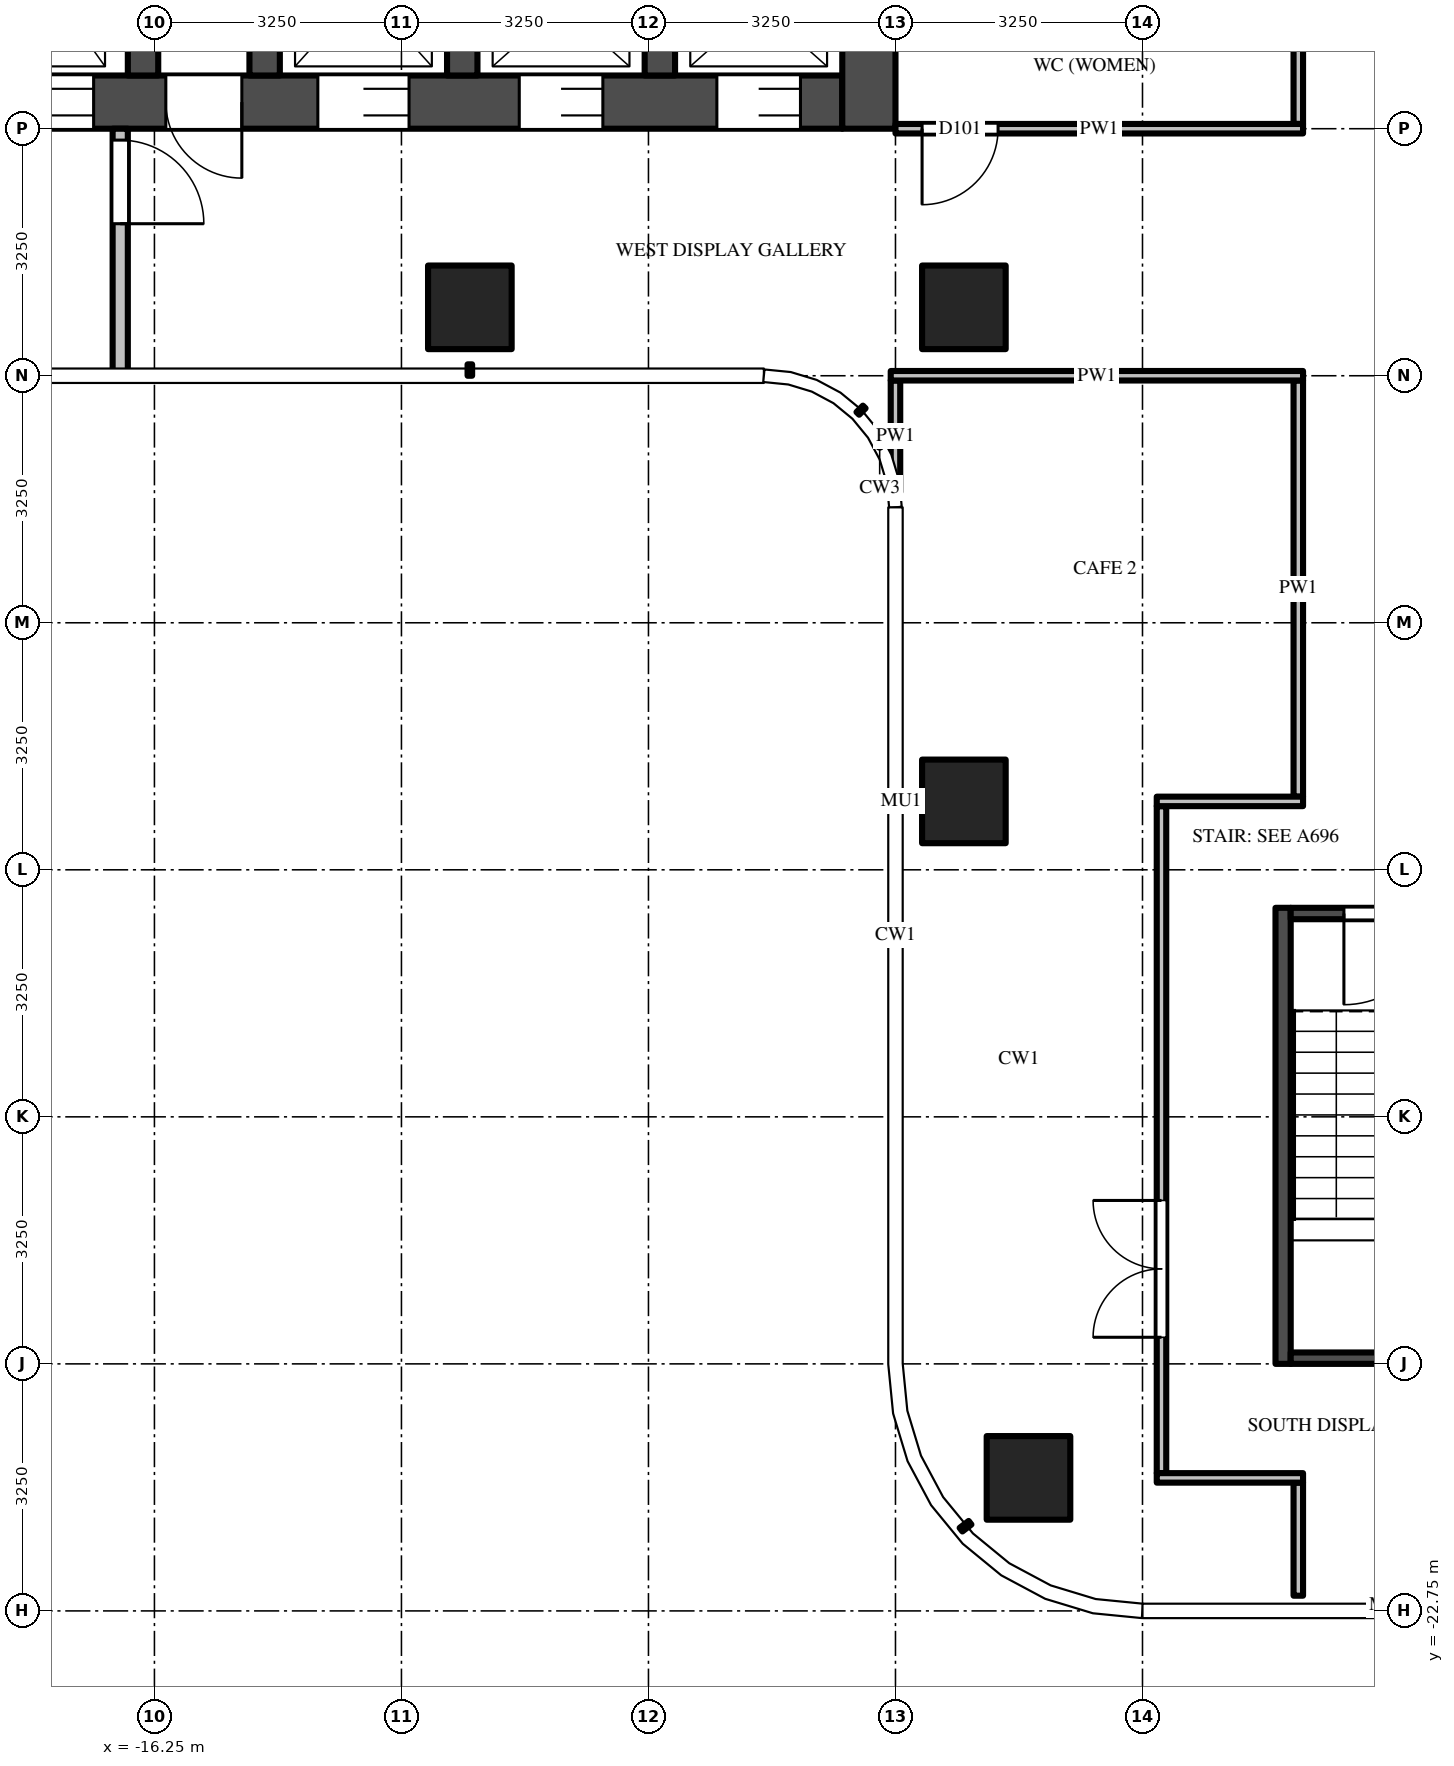
"""IFC4 building model, lengths in metres.
Left out: names, types, materials, properties, quantities, classifications, styles, units other than length and angle.
Written with IfcOpenShell. Run it as: python <this file> out.ifc"""

import sys

from ifc_helpers import new_model, si_unit, direction, frame, frame_2d, origin, origin_2d, place, context, subcontext, project, spatial, polyline, rectangle, outline, extrude, source, transform, mapped, element, fill, save


model = new_model("IFC4")
c1 = context("Model", 3, precision=1e-05, world=origin(), true_north=direction((0.0, 1.0)))
c2 = subcontext(c1, "Body", "Model", "MODEL_VIEW")
j1 = project(units=[si_unit("LENGTHUNIT", "METRE"), si_unit("PLANEANGLEUNIT", "RADIAN")], contexts=[c1])
p1 = place(None, origin())
s1 = spatial("IfcSite", under=j1, at=p1, CompositionType="ELEMENT")
p2 = place(p1, origin())
s2 = spatial("IfcBuilding", under=s1, at=p2, CompositionType="ELEMENT")
p3 = place(p2, frame((0.0, 0.0, 251.9)))
s3 = spatial("IfcBuildingStorey", under=s2, at=p3, CompositionType="ELEMENT", Elevation=251.9)
m1 = source(origin(), c2, "Body", "SweptSolid", [
    extrude(rectangle(XDim=1.1, YDim=1.1, at=origin_2d()), origin(), (0.0, 0.0, 1.0), 3.9),
])
for number, where, z_axis, x_axis in (
    (1, (-5.6, -5.6, 0.0), (0.0, 0.0, 1.0), (1.0, 0.0, 0.0)),
    (2, (-5.6, -12.1, 0.0), (0.0, 0.0, 1.0), (1.0, 0.0, 0.0)),
    (3, (-4.75, -21.0, 0.0), (0.0, 0.0, 1.0), (1.0, 0.0, 0.0)),
    (4, (-12.1, -5.6, 0.0), (0.0, 0.0, 1.0), (1.0, 0.0, 0.0)),
):
    element("IfcColumn", number, at=place(p3, frame(where, z_axis=z_axis, x_axis=x_axis)), inside=s3, PredefinedType="COLUMN", context=c2, shape_type="MappedRepresentation", body=[
        mapped(m1, transform((0.0, 0.0, 0.0))),
    ])
m2 = source(origin(), c2, "Body", "SweptSolid", [
    extrude(rectangle(XDim=14.85, YDim=0.7, at=frame_2d((7.425, 0.0))), origin(), (0.0, 0.0, 1.0), 3.7),
])
p4 = place(p3, frame((-7.2, -2.9, 0.0), z_axis=(0.0, 0.0, 1.0), x_axis=(-1.0, 0.0, 0.0)))
e5 = element("IfcWall", 5, at=p4, inside=s3, PredefinedType="SHEAR", context=c2, shape_type="MappedRepresentation", body=[
    mapped(m2, transform((0.0, 0.0, 0.0))),
])
m3 = source(origin(), c2, "Body", "SweptSolid", [
    extrude(rectangle(XDim=1.1, YDim=2.1, at=frame_2d((0.55, 1.05))), frame((0.0, 0.36, 0.0), z_axis=(0.0, -1.0, 0.0), x_axis=(1.0, 0.0, 0.0)), (0.0, 0.0, 1.0), 0.72),
])
p5 = place(p4, frame((0.55, 0.0, 0.0)))
e6 = element("IfcOpeningElement", 6, at=p5, cuts=e5, PredefinedType="OPENING", context=c2, shape_type="MappedRepresentation", body=[
    mapped(m3, transform((0.0, 0.0, 0.0))),
])
p6 = place(p4, frame((3.15, 0.0, 0.0)))
e7 = element("IfcOpeningElement", 7, at=p6, cuts=e5, PredefinedType="OPENING", context=c2, shape_type="MappedRepresentation", body=[
    mapped(m3, transform((0.0, 0.0, 0.0))),
])
m4 = source(origin(), c2, "Body", "SweptSolid", [
    extrude(rectangle(XDim=1.2, YDim=2.1, at=frame_2d((0.6, 1.05))), frame((0.0, 0.36, 0.0), z_axis=(0.0, -1.0, 0.0), x_axis=(1.0, 0.0, 0.0)), (0.0, 0.0, 1.0), 0.72),
])
p7 = place(p4, frame((5.7, 0.0, 0.0)))
e8 = element("IfcOpeningElement", 8, at=p7, cuts=e5, PredefinedType="OPENING", context=c2, shape_type="MappedRepresentation", body=[
    mapped(m4, transform((0.0, 0.0, 0.0))),
])
m5 = source(origin(), c2, "Body", "SweptSolid", [
    extrude(rectangle(XDim=1.3, YDim=2.1, at=frame_2d((0.65, 1.05))), frame((0.0, 0.36, 0.0), z_axis=(0.0, -1.0, 0.0), x_axis=(1.0, 0.0, 0.0)), (0.0, 0.0, 1.0), 0.72),
])
p8 = place(p4, frame((12.2, 0.0, 0.0)))
e9 = element("IfcOpeningElement", 9, at=p8, cuts=e5, PredefinedType="OPENING", context=c2, shape_type="MappedRepresentation", body=[
    mapped(m5, transform((0.0, 0.0, 0.0))),
])
p9 = place(p4, frame((9.85, 0.0, 0.0)))
e10 = element("IfcOpeningElement", 10, at=p9, cuts=e5, PredefinedType="OPENING", context=c2, shape_type="MappedRepresentation", body=[
    mapped(m4, transform((0.0, 0.0, 0.0))),
])
m6 = source(origin(), c2, "Body", "SweptSolid", [
    extrude(rectangle(XDim=1.0, YDim=2.1, at=frame_2d((0.5, 1.05))), frame((0.0, 0.36, 0.0), z_axis=(0.0, -1.0, 0.0), x_axis=(1.0, 0.0, 0.0)), (0.0, 0.0, 1.0), 0.72),
])
p10 = place(p4, frame((7.9, 0.0, 0.0)))
e11 = element("IfcOpeningElement", 11, at=p10, cuts=e5, PredefinedType="OPENING", context=c2, shape_type="MappedRepresentation", body=[
    mapped(m6, transform((0.0, 0.0, 0.0))),
])
m7 = source(origin(), c2, "Body", "SweptSolid", [
    extrude(rectangle(XDim=9.05, YDim=0.7, at=frame_2d((4.525, 0.0))), origin(), (0.0, 0.0, 1.0), 3.7),
])
p11 = place(p3, frame((-6.85, 5.8, 0.0), z_axis=(0.0, 0.0, 1.0), x_axis=(0.0, -1.0, 0.0)))
e12 = element("IfcWall", 12, at=p11, inside=s3, PredefinedType="SHEAR", context=c2, shape_type="MappedRepresentation", body=[
    mapped(m7, transform((0.0, 0.0, 0.0))),
])
m8 = source(origin(), c2, "Body", "SweptSolid", [
    extrude(rectangle(XDim=1.8, YDim=2.1, at=frame_2d((0.9, 1.05))), frame((0.0, 0.36, 0.0), z_axis=(0.0, -1.0, 0.0), x_axis=(1.0, 0.0, 0.0)), (0.0, 0.0, 1.0), 0.72),
])
p12 = place(p11, frame((3.15, 0.0, 0.0)))
e13 = element("IfcOpeningElement", 13, at=p12, cuts=e12, PredefinedType="OPENING", context=c2, shape_type="MappedRepresentation", body=[
    mapped(m8, transform((0.0, 0.0, 0.0))),
])
m9 = source(origin(), c2, "Body", "SweptSolid", [
    extrude(rectangle(XDim=2.45, YDim=0.4, at=frame_2d((1.225, 0.0))), origin(), (0.0, 0.0, 1.0), 3.7),
])
for number, where, z_axis, x_axis in (
    (14, (-9.6, -0.1, 0.0), (0.0, 0.0, 1.0), (0.0, -1.0, 0.0)),
    (15, (-12.2, -0.1, 0.0), (0.0, 0.0, 1.0), (0.0, -1.0, 0.0)),
    (16, (-14.8, -0.1, 0.0), (0.0, 0.0, 1.0), (0.0, -1.0, 0.0)),
    (17, (-16.4, -0.1, 0.0), (0.0, 0.0, 1.0), (0.0, -1.0, 0.0)),
):
    element("IfcWall", number, at=place(p3, frame(where, z_axis=z_axis, x_axis=x_axis)), inside=s3, PredefinedType="SHEAR", context=c2, shape_type="MappedRepresentation", body=[
        mapped(m9, transform((0.0, 0.0, 0.0))),
    ])
m10 = source(origin(), c2, "Body", "SweptSolid", [
    extrude(rectangle(XDim=3.25, YDim=0.2, at=frame_2d((1.625, 0.0))), origin(), (0.0, 0.0, 1.0), 3.7),
])
p13 = place(p3, frame((-16.7, -3.25, 0.0), z_axis=(0.0, 0.0, 1.0), x_axis=(0.0, -1.0, 0.0)))
e18 = element("IfcWall", 18, at=p13, inside=s3, PredefinedType="PARTITIONING", context=c2, shape_type="MappedRepresentation", body=[
    mapped(m10, transform((0.0, 0.0, 0.0))),
])
m11 = source(origin(), c2, "Body", "SweptSolid", [
    extrude(rectangle(XDim=1.1, YDim=2.1, at=frame_2d((0.55, 1.05))), frame((0.0, 0.11, 0.0), z_axis=(0.0, -1.0, 0.0), x_axis=(1.0, 0.0, 0.0)), (0.0, 0.0, 1.0), 0.22),
])
p14 = place(p13, frame((0.15, 0.0, 0.0)))
e19 = element("IfcOpeningElement", 19, at=p14, cuts=e18, PredefinedType="OPENING", context=c2, shape_type="MappedRepresentation", body=[
    mapped(m11, transform((0.0, 0.0, 0.0))),
])
m12 = source(origin(), c2, "Body", "SweptSolid", [
    extrude(rectangle(XDim=6.0, YDim=0.2, at=frame_2d((3.0, 0.0))), origin(), (0.0, 0.0, 1.0), 3.7),
])
p15 = place(p3, frame((-1.4, -13.5, 0.0), z_axis=(0.0, 0.0, 1.0), x_axis=(0.0, -1.0, 0.0)))
e20 = element("IfcWall", 20, at=p15, inside=s3, PredefinedType="SHEAR", context=c2, shape_type="MappedRepresentation", body=[
    mapped(m12, transform((0.0, 0.0, 0.0))),
])
m13 = source(origin(), c2, "Body", "SweptSolid", [
    extrude(rectangle(XDim=2.6, YDim=0.15, at=frame_2d((1.3, 0.0))), origin(), (0.0, 0.0, 1.0), 3.7),
])
p16 = place(p3, frame((1.3, -13.575, 0.0), z_axis=(0.0, 0.0, 1.0), x_axis=(-1.0, 0.0, 0.0)))
e21 = element("IfcWall", 21, at=p16, inside=s3, PredefinedType="SHEAR", context=c2, shape_type="MappedRepresentation", body=[
    mapped(m13, transform((0.0, 0.0, 0.0))),
])
m14 = source(origin(), c2, "Body", "SweptSolid", [
    extrude(rectangle(XDim=1.2, YDim=2.1, at=frame_2d((0.6, 1.05))), frame((0.0, 0.085, 0.0), z_axis=(0.0, -1.0, 0.0), x_axis=(1.0, 0.0, 0.0)), (0.0, 0.0, 1.0), 0.17),
])
p17 = place(p16, frame((0.7, 0.0, 0.0)))
e22 = element("IfcOpeningElement", 22, at=p17, cuts=e21, PredefinedType="OPENING", context=c2, shape_type="MappedRepresentation", body=[
    mapped(m14, transform((0.0, 0.0, 0.0))),
])
p18 = place(p3, frame((1.3, -19.425, 0.0), z_axis=(0.0, 0.0, 1.0), x_axis=(-1.0, 0.0, 0.0)))
e23 = element("IfcWall", 23, at=p18, inside=s3, PredefinedType="SHEAR", context=c2, shape_type="MappedRepresentation", body=[
    mapped(m13, transform((0.0, 0.0, 0.0))),
])
p19 = place(p3, origin())
e24 = element("IfcWall", 24, at=p19, inside=s3, PredefinedType="USERDEFINED", context=c2, shape_type="SweptSolid", body=[
    extrude(outline(polyline([(-18.449, -8.887), (-19.339, -8.854), (-20.05, -8.692), (-19.917, -8.107), (-19.26, -8.257), (-18.487, -8.285), (-17.665, -8.151), (-17.56, -8.115), (-17.369, -8.684), (-17.521, -8.735), (-18.449, -8.887)])), origin(), (0.0, 0.0, 1.0), 0.5),
])
m15 = source(origin(), c2, "Body", "SweptSolid", [
    extrude(rectangle(XDim=1.469, YDim=0.125, at=frame_2d((0.734, 0.0))), origin(), (0.0, 0.0, 1.0), 3.7),
])
p20 = place(p3, frame((-6.5, -6.562, 0.0), z_axis=(0.0, 0.0, 1.0), x_axis=(0.0, -1.0, 0.0)))
e25 = element("IfcWall", 25, at=p20, inside=s3, PredefinedType="PARTITIONING", context=c2, shape_type="MappedRepresentation", body=[
    mapped(m15, transform((0.0, 0.0, 0.0))),
])
m16 = source(origin(), c2, "Body", "SweptSolid", [
    extrude(rectangle(XDim=8.775, YDim=0.125, at=frame_2d((4.387, 0.0))), origin(), (0.0, 0.0, 1.0), 2.78),
])
p21 = place(p3, frame((-3.0, -20.938, 0.0), z_axis=(0.0, 0.0, 1.0), x_axis=(0.0, 1.0, 0.0)))
e26 = element("IfcWall", 26, at=p21, inside=s3, PredefinedType="PARTITIONING", context=c2, shape_type="MappedRepresentation", body=[
    mapped(m16, transform((0.0, 0.0, 0.0))),
])
m17 = source(origin(), c2, "Body", "SweptSolid", [
    extrude(rectangle(XDim=1.8, YDim=2.1, at=frame_2d((0.9, 1.05))), frame((0.0, 0.073, 0.0), z_axis=(0.0, -1.0, 0.0), x_axis=(1.0, 0.0, 0.0)), (0.0, 0.0, 1.0), 0.145),
])
p22 = place(p21, frame((1.788, 0.0, 0.0)))
e27 = element("IfcOpeningElement", 27, at=p22, cuts=e26, PredefinedType="OPENING", context=c2, shape_type="MappedRepresentation", body=[
    mapped(m17, transform((0.0, 0.0, 0.0))),
])
m18 = source(origin(), c2, "Body", "SweptSolid", [
    extrude(rectangle(XDim=1.488, YDim=0.125, at=frame_2d((0.744, 0.0))), origin(), (0.0, 0.0, 1.0), 2.78),
])
p23 = place(p3, frame((-1.2, -21.062, 0.0), z_axis=(0.0, 0.0, 1.0), x_axis=(0.0, -1.0, 0.0)))
e28 = element("IfcWall", 28, at=p23, inside=s3, PredefinedType="PARTITIONING", context=c2, shape_type="MappedRepresentation", body=[
    mapped(m18, transform((0.0, 0.0, 0.0))),
])
m19 = source(origin(), c2, "Body", "SweptSolid", [
    extrude(rectangle(XDim=5.475, YDim=0.125, at=frame_2d((2.738, 0.0))), origin(), (0.0, 0.0, 1.0), 2.997),
])
p24 = place(p3, frame((-1.2, -6.562, 0.0), z_axis=(0.0, 0.0, 1.0), x_axis=(0.0, -1.0, 0.0)))
e29 = element("IfcWall", 29, at=p24, inside=s3, PredefinedType="PARTITIONING", context=c2, shape_type="MappedRepresentation", body=[
    mapped(m19, transform((0.0, 0.0, 0.0))),
])
m20 = source(origin(), c2, "Body", "SweptSolid", [
    extrude(rectangle(XDim=3.125, YDim=0.125, at=frame_2d((1.562, 0.0))), origin(), (0.0, 0.0, 1.0), 3.068),
])
p25 = place(p3, frame((-1.2, -0.062, 0.0), z_axis=(0.0, 0.0, 1.0), x_axis=(0.0, -1.0, 0.0)))
e30 = element("IfcWall", 30, at=p25, inside=s3, PredefinedType="PARTITIONING", context=c2, shape_type="MappedRepresentation", body=[
    mapped(m20, transform((0.0, 0.0, 0.0))),
])
m21 = source(origin(), c2, "Body", "SweptSolid", [
    extrude(rectangle(XDim=1.925, YDim=0.125, at=frame_2d((0.962, 0.0))), origin(), (0.0, 0.0, 1.0), 2.78),
])
p26 = place(p3, frame((-1.137, -21.0, 0.0), z_axis=(0.0, 0.0, 1.0), x_axis=(-1.0, 0.0, 0.0)))
e31 = element("IfcWall", 31, at=p26, inside=s3, PredefinedType="PARTITIONING", context=c2, shape_type="MappedRepresentation", body=[
    mapped(m21, transform((0.0, 0.0, 0.0))),
])
m22 = source(origin(), c2, "Body", "SweptSolid", [
    extrude(rectangle(XDim=1.925, YDim=0.125, at=frame_2d((0.962, 0.0))), origin(), (0.0, 0.0, 1.0), 2.997),
])
p27 = place(p3, frame((-3.062, -12.1, 0.0), z_axis=(0.0, 0.0, 1.0), x_axis=(1.0, 0.0, 0.0)))
e32 = element("IfcWall", 32, at=p27, inside=s3, PredefinedType="PARTITIONING", context=c2, shape_type="MappedRepresentation", body=[
    mapped(m22, transform((0.0, 0.0, 0.0))),
])
m23 = source(origin(), c2, "Body", "SweptSolid", [
    extrude(rectangle(XDim=5.425, YDim=0.125, at=frame_2d((2.712, 0.0))), origin(), (0.0, 0.0, 1.0), 2.78),
])
p28 = place(p3, frame((-1.137, -6.5, 0.0), z_axis=(0.0, 0.0, 1.0), x_axis=(-1.0, 0.0, 0.0)))
e33 = element("IfcWall", 33, at=p28, inside=s3, PredefinedType="PARTITIONING", context=c2, shape_type="MappedRepresentation", body=[
    mapped(m23, transform((0.0, 0.0, 0.0))),
])
m24 = source(origin(), c2, "Body", "SweptSolid", [
    extrude(rectangle(XDim=5.363, YDim=0.125, at=frame_2d((2.681, 0.0))), origin(), (0.0, 0.0, 1.0), 2.997),
])
p29 = place(p3, frame((-1.137, -3.25, 0.0), z_axis=(0.0, 0.0, 1.0), x_axis=(-1.0, 0.0, 0.0)))
e34 = element("IfcWall", 34, at=p29, inside=s3, PredefinedType="PARTITIONING", context=c2, shape_type="MappedRepresentation", body=[
    mapped(m24, transform((0.0, 0.0, 0.0))),
])
m25 = source(origin(), c2, "Body", "SweptSolid", [
    extrude(rectangle(XDim=1.0, YDim=2.1, at=frame_2d((0.5, 1.05))), frame((0.0, 0.073, 0.0), z_axis=(0.0, -1.0, 0.0), x_axis=(1.0, 0.0, 0.0)), (0.0, 0.0, 1.0), 0.145),
])
p30 = place(p29, frame((4.012, 0.0, 0.0)))
e35 = element("IfcOpeningElement", 35, at=p30, cuts=e34, PredefinedType="OPENING", context=c2, shape_type="MappedRepresentation", body=[
    mapped(m25, transform((0.0, 0.0, 0.0))),
])
m26 = source(origin(), c2, "Body", "SweptSolid", [
    extrude(rectangle(XDim=1.1, YDim=2.1, at=frame_2d((0.55, 1.05))), frame((0.0, -0.275, 0.0), z_axis=(0.0, -1.0, 0.0), x_axis=(1.0, 0.0, 0.0)), (0.0, 0.0, 1.0), 0.05),
])
p31 = place(p5, origin())
e36 = element("IfcDoor", 36, at=p31, inside=s3, OperationType="DOUBLE_DOOR_SLIDING", PredefinedType="DOOR", context=c2, shape_type="MappedRepresentation", body=[
    mapped(m26, transform((0.0, 0.0, 0.0))),
])
fill(e6, e36)
p32 = place(p6, origin())
e37 = element("IfcDoor", 37, at=p32, inside=s3, OperationType="DOUBLE_DOOR_SLIDING", PredefinedType="DOOR", context=c2, shape_type="MappedRepresentation", body=[
    mapped(m26, transform((0.0, 0.0, 0.0))),
])
fill(e7, e37)
m27 = source(origin(), c2, "Body", "SweptSolid", [
    extrude(rectangle(XDim=1.2, YDim=2.1, at=frame_2d((0.6, 1.05))), frame((0.0, -0.275, 0.0), z_axis=(0.0, -1.0, 0.0), x_axis=(1.0, 0.0, 0.0)), (0.0, 0.0, 1.0), 0.05),
])
p33 = place(p7, origin())
e38 = element("IfcDoor", 38, at=p33, inside=s3, OperationType="DOUBLE_DOOR_SLIDING", PredefinedType="DOOR", context=c2, shape_type="MappedRepresentation", body=[
    mapped(m27, transform((0.0, 0.0, 0.0))),
])
fill(e8, e38)
p34 = place(p9, origin())
e39 = element("IfcDoor", 39, at=p34, inside=s3, OperationType="DOUBLE_DOOR_SLIDING", PredefinedType="DOOR", context=c2, shape_type="MappedRepresentation", body=[
    mapped(m27, transform((0.0, 0.0, 0.0))),
])
fill(e10, e39)
m28 = source(origin(), c2, "Body", "SweptSolid", [
    extrude(rectangle(XDim=1.0, YDim=2.1, at=frame_2d((0.5, 1.05))), frame((0.0, -0.275, 0.0), z_axis=(0.0, -1.0, 0.0), x_axis=(1.0, 0.0, 0.0)), (0.0, 0.0, 1.0), 0.05),
])
p35 = place(p10, origin())
e40 = element("IfcDoor", 40, at=p35, inside=s3, OperationType="SINGLE_SWING_LEFT", PredefinedType="DOOR", context=c2, shape_type="MappedRepresentation", body=[
    mapped(m28, transform((0.0, 0.0, 0.0))),
])
fill(e11, e40)
m29 = source(origin(), c2, "Body", "SweptSolid", [
    extrude(rectangle(XDim=1.1, YDim=2.1, at=frame_2d((0.55, 1.05))), frame((0.0, 0.025, 0.0), z_axis=(0.0, -1.0, 0.0), x_axis=(1.0, 0.0, 0.0)), (0.0, 0.0, 1.0), 0.05),
])
p36 = place(p14, origin())
e41 = element("IfcDoor", 41, at=p36, inside=s3, OperationType="SINGLE_SWING_RIGHT", PredefinedType="DOOR", context=c2, shape_type="MappedRepresentation", body=[
    mapped(m29, transform((0.0, 0.0, 0.0))),
])
fill(e19, e41)
m30 = source(origin(), c2, "Body", "SweptSolid", [
    extrude(rectangle(XDim=1.2, YDim=2.1, at=frame_2d((0.6, 1.05))), frame((0.0, 0.025, 0.0), z_axis=(0.0, -1.0, 0.0), x_axis=(1.0, 0.0, 0.0)), (0.0, 0.0, 1.0), 0.05),
])
p37 = place(p17, origin())
e42 = element("IfcDoor", 42, at=p37, inside=s3, OperationType="SINGLE_SWING_RIGHT", PredefinedType="DOOR", context=c2, shape_type="MappedRepresentation", body=[
    mapped(m30, transform((0.0, 0.0, 0.0))),
])
fill(e22, e42)
m31 = source(origin(), c2, "Body", "SweptSolid", [
    extrude(rectangle(XDim=1.8, YDim=2.1, at=frame_2d((0.9, 1.05))), frame((0.0, 0.025, 0.0), z_axis=(0.0, -1.0, 0.0), x_axis=(1.0, 0.0, 0.0)), (0.0, 0.0, 1.0), 0.05),
])
p38 = place(p22, origin())
e43 = element("IfcDoor", 43, at=p38, inside=s3, OperationType="DOUBLE_DOOR_SINGLE_SWING", PredefinedType="DOOR", context=c2, shape_type="MappedRepresentation", body=[
    mapped(m31, transform((0.0, 0.0, 0.0))),
])
fill(e27, e43)
m32 = source(origin(), c2, "Body", "SweptSolid", [
    extrude(rectangle(XDim=1.0, YDim=2.1, at=frame_2d((0.5, 1.05))), frame((0.0, 0.025, 0.0), z_axis=(0.0, -1.0, 0.0), x_axis=(1.0, 0.0, 0.0)), (0.0, 0.0, 1.0), 0.05),
])
p39 = place(p30, origin())
e44 = element("IfcDoor", 44, at=p39, inside=s3, OperationType="SINGLE_SWING_RIGHT", PredefinedType="DOOR", context=c2, shape_type="MappedRepresentation", body=[
    mapped(m32, transform((0.0, 0.0, 0.0))),
])
fill(e35, e44)
save(model, sys.argv[1])
